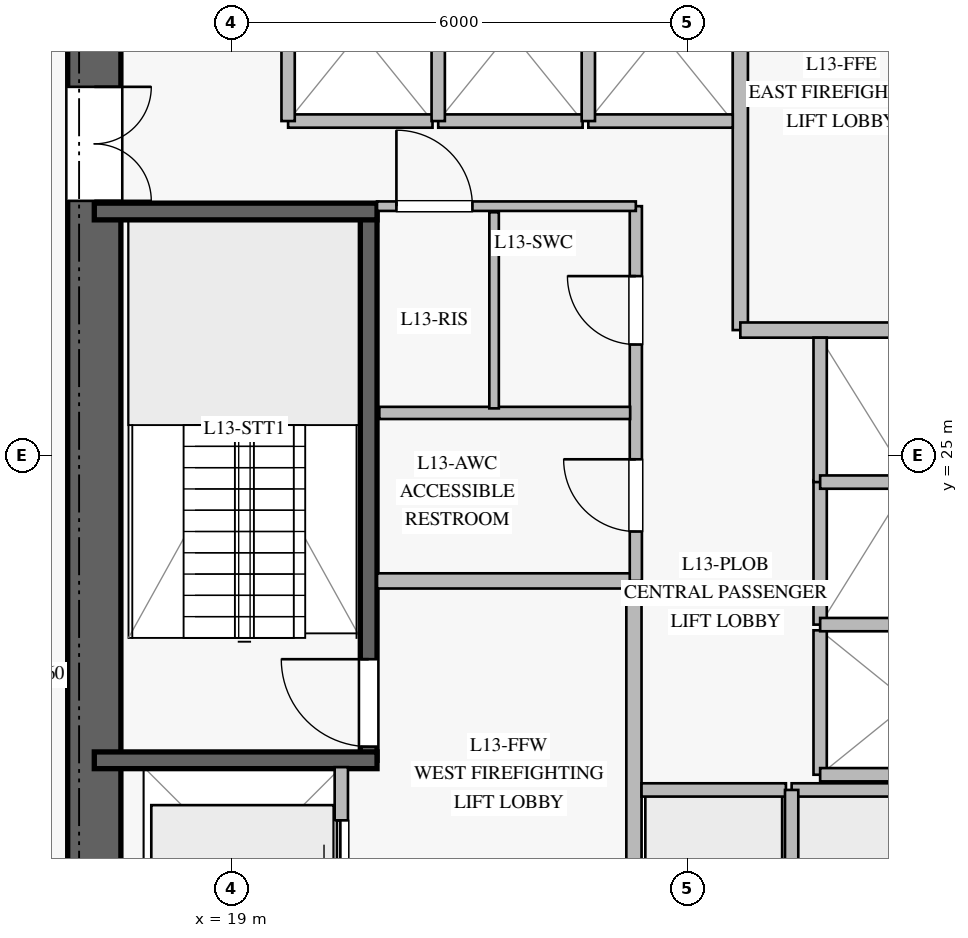
"""IFC4 building model, lengths in metres.
Left out: names, types, materials, properties, quantities, classifications, styles, units other than length and angle.
Written with IfcOpenShell. Run it as: python <this file> out.ifc"""

import sys

from ifc_helpers import new_model, si_unit, direction, frame, frame_2d, origin, place, context, subcontext, project, spatial, rectangle, extrude, element, fill, save


model = new_model("IFC4")
c1 = context("Model", 3, precision=1e-05, world=origin(), true_north=direction((0.0, 1.0)))
c2 = subcontext(c1, "Body", "Model", "MODEL_VIEW")
j1 = project(units=[si_unit("LENGTHUNIT", "METRE"), si_unit("PLANEANGLEUNIT", "RADIAN")], contexts=[c1])
p1 = place(None, origin())
s1 = spatial("IfcSite", under=j1, at=p1, CompositionType="ELEMENT")
p2 = place(p1, origin())
s2 = spatial("IfcBuilding", under=s1, at=p2, CompositionType="ELEMENT")
p3 = place(p2, frame((0.0, 0.0, 56.0)))
s3 = spatial("IfcBuildingStorey", under=s2, at=p3, CompositionType="ELEMENT", Elevation=56.0)
p4 = place(p3, frame((17.2, 31.85, 0.0), z_axis=(0.0, 0.0, 1.0), x_axis=(0.0, -1.0, 0.0)))
e1 = element("IfcWall", 1, at=p4, inside=s3, PredefinedType="SHEAR", context=c2, shape_type="SweptSolid", body=[
    extrude(rectangle(XDim=13.7, YDim=0.7, at=frame_2d((6.85, 0.0))), origin(), (0.0, 0.0, 1.0), 3.76),
])
p5 = place(p4, frame((2.0, 0.0, 0.0)))
e2 = element("IfcOpeningElement", 2, at=p5, cuts=e1, PredefinedType="OPENING", context=c2, shape_type="SweptSolid", body=[
    extrude(rectangle(XDim=1.5, YDim=2.2, at=frame_2d((0.75, 1.1))), frame((0.0, 0.36, 0.0), z_axis=(0.0, -1.0, 0.0), x_axis=(1.0, 0.0, 0.0)), (0.0, 0.0, 1.0), 0.72),
])
p6 = place(p3, frame((20.81, 20.99, 0.0), z_axis=(0.0, 0.0, 1.0), x_axis=(0.0, 1.0, 0.0)))
e3 = element("IfcWall", 3, at=p6, inside=s3, PredefinedType="SOLIDWALL", context=c2, shape_type="SweptSolid", body=[
    extrude(rectangle(XDim=7.22, YDim=0.22, at=frame_2d((3.61, 0.0))), origin(), (0.0, 0.0, 1.0), 3.76),
])
p7 = place(p6, frame((0.18, 0.0, 0.0)))
e4 = element("IfcOpeningElement", 4, at=p7, cuts=e3, PredefinedType="OPENING", context=c2, shape_type="SweptSolid", body=[
    extrude(rectangle(XDim=1.15, YDim=2.2, at=frame_2d((0.575, 1.1))), frame((0.0, 0.12, 0.0), z_axis=(0.0, -1.0, 0.0), x_axis=(1.0, 0.0, 0.0)), (0.0, 0.0, 1.0), 0.24),
])
for number, where, z_axis, x_axis in (
    (5, (17.2, 20.99, 0.0), (0.0, 0.0, 1.0), (1.0, 0.0, 0.0)),
    (6, (17.2, 28.21, 0.0), (0.0, 0.0, 1.0), (1.0, 0.0, 0.0)),
):
    element("IfcWall", number, at=place(p3, frame(where, z_axis=z_axis, x_axis=x_axis)), inside=s3, PredefinedType="SOLIDWALL", context=c2, shape_type="SweptSolid", body=[
        extrude(rectangle(XDim=3.72, YDim=0.22, at=frame_2d((1.86, 0.0))), origin(), (0.0, 0.0, 1.0), 3.76),
    ])
p8 = place(p3, frame((24.3, 18.2, 0.0), z_axis=(0.0, 0.0, 1.0), x_axis=(0.0, 1.0, 0.0)))
e7 = element("IfcWall", 7, at=p8, inside=s3, PredefinedType="PARTITIONING", context=c2, shape_type="SweptSolid", body=[
    extrude(rectangle(XDim=5.15, YDim=0.2, at=frame_2d((2.575, 0.0))), origin(), (0.0, 0.0, 1.0), 3.76),
])
p9 = place(p3, frame((20.92, 23.35, 0.0), z_axis=(0.0, 0.0, 1.0), x_axis=(1.0, 0.0, 0.0)))
e8 = element("IfcWall", 8, at=p9, inside=s3, PredefinedType="PARTITIONING", context=c2, shape_type="SweptSolid", body=[
    extrude(rectangle(XDim=3.38, YDim=0.2, at=frame_2d((1.69, 0.0))), origin(), (0.0, 0.0, 1.0), 3.76),
])
p10 = place(p3, frame((25.7, 26.65, 0.0), z_axis=(0.0, 0.0, 1.0), x_axis=(0.0, 1.0, 0.0)))
e9 = element("IfcWall", 9, at=p10, inside=s3, PredefinedType="PARTITIONING", context=c2, shape_type="SweptSolid", body=[
    extrude(rectangle(XDim=5.15, YDim=0.2, at=frame_2d((2.575, 0.0))), origin(), (0.0, 0.0, 1.0), 3.76),
])
p11 = place(p3, frame((25.7, 26.65, 0.0), z_axis=(0.0, 0.0, 1.0), x_axis=(1.0, 0.0, 0.0)))
e10 = element("IfcWall", 10, at=p11, inside=s3, PredefinedType="PARTITIONING", context=c2, shape_type="SweptSolid", body=[
    extrude(rectangle(XDim=3.38, YDim=0.2, at=frame_2d((1.69, 0.0))), origin(), (0.0, 0.0, 1.0), 3.76),
])
p12 = place(p3, frame((24.325, 23.35, 0.0), z_axis=(0.0, 0.0, 1.0), x_axis=(0.0, 1.0, 0.0)))
e11 = element("IfcWall", 11, at=p12, inside=s3, PredefinedType="PLUMBINGWALL", context=c2, shape_type="SweptSolid", body=[
    extrude(rectangle(XDim=4.93, YDim=0.16, at=frame_2d((2.465, 0.0))), origin(), (0.0, 0.0, 1.0), 3.76),
])
p13 = place(p12, frame((0.65, 0.0, 0.0)))
e12 = element("IfcOpeningElement", 12, at=p13, cuts=e11, PredefinedType="OPENING", context=c2, shape_type="SweptSolid", body=[
    extrude(rectangle(XDim=0.95, YDim=2.1, at=frame_2d((0.475, 1.05))), frame((0.0, 0.09, 0.0), z_axis=(0.0, -1.0, 0.0), x_axis=(1.0, 0.0, 0.0)), (0.0, 0.0, 1.0), 0.18),
])
p14 = place(p12, frame((3.11, 0.0, 0.0)))
e13 = element("IfcOpeningElement", 13, at=p14, cuts=e11, PredefinedType="OPENING", context=c2, shape_type="SweptSolid", body=[
    extrude(rectangle(XDim=0.9, YDim=2.1, at=frame_2d((0.45, 1.05))), frame((0.0, 0.09, 0.0), z_axis=(0.0, -1.0, 0.0), x_axis=(1.0, 0.0, 0.0)), (0.0, 0.0, 1.0), 0.18),
])
p15 = place(p3, frame((20.92, 28.28, 0.0), z_axis=(0.0, 0.0, 1.0), x_axis=(1.0, 0.0, 0.0)))
e14 = element("IfcWall", 14, at=p15, inside=s3, PredefinedType="PARTITIONING", context=c2, shape_type="SweptSolid", body=[
    extrude(rectangle(XDim=3.405, YDim=0.125, at=frame_2d((1.703, 0.0))), origin(), (0.0, 0.0, 1.0), 3.76),
])
p16 = place(p15, frame((0.255, 0.0, 0.0)))
e15 = element("IfcOpeningElement", 15, at=p16, cuts=e14, PredefinedType="OPENING", context=c2, shape_type="SweptSolid", body=[
    extrude(rectangle(XDim=1.0, YDim=2.15, at=frame_2d((0.5, 1.075))), frame((0.0, 0.073, 0.0), z_axis=(0.0, -1.0, 0.0), x_axis=(1.0, 0.0, 0.0)), (0.0, 0.0, 1.0), 0.145),
])
p17 = place(p3, frame((20.95, 25.56, 0.0), z_axis=(0.0, 0.0, 1.0), x_axis=(1.0, 0.0, 0.0)))
e16 = element("IfcWall", 16, at=p17, inside=s3, PredefinedType="PLUMBINGWALL", context=c2, shape_type="SweptSolid", body=[
    extrude(rectangle(XDim=3.3, YDim=0.16, at=frame_2d((1.65, 0.0))), origin(), (0.0, 0.0, 1.0), 3.76),
])
p18 = place(p3, frame((22.46, 25.62, 0.0), z_axis=(0.0, 0.0, 1.0), x_axis=(0.0, 1.0, 0.0)))
e17 = element("IfcWall", 17, at=p18, inside=s3, PredefinedType="PARTITIONING", context=c2, shape_type="SweptSolid", body=[
    extrude(rectangle(XDim=2.58, YDim=0.125, at=frame_2d((1.29, 0.0))), origin(), (0.0, 0.0, 1.0), 3.76),
])
p19 = place(p3, frame((24.4, 20.6, 0.0), z_axis=(0.0, 0.0, 1.0), x_axis=(1.0, 0.0, 0.0)))
e18 = element("IfcWall", 18, at=p19, inside=s3, PredefinedType="PARTITIONING", context=c2, shape_type="SweptSolid", body=[
    extrude(rectangle(XDim=1.9, YDim=0.175, at=frame_2d((0.95, 0.0))), origin(), (0.0, 0.0, 1.0), 3.76),
])
p20 = place(p3, frame((26.375, 20.6, 0.0), z_axis=(0.0, 0.0, 1.0), x_axis=(1.0, 0.0, 0.0)))
e19 = element("IfcWall", 19, at=p20, inside=s3, PredefinedType="PARTITIONING", context=c2, shape_type="SweptSolid", body=[
    extrude(rectangle(XDim=1.9, YDim=0.175, at=frame_2d((0.95, 0.0))), origin(), (0.0, 0.0, 1.0), 3.76),
])
p21 = place(p3, frame((26.375, 18.25, 0.0), z_axis=(0.0, 0.0, 1.0), x_axis=(0.0, 1.0, 0.0)))
e20 = element("IfcWall", 20, at=p21, inside=s3, PredefinedType="PARTITIONING", context=c2, shape_type="SweptSolid", body=[
    extrude(rectangle(XDim=2.35, YDim=0.175, at=frame_2d((1.175, 0.0))), origin(), (0.0, 0.0, 1.0), 3.76),
])
p22 = place(p3, frame((19.75, 29.4, 0.0), z_axis=(0.0, 0.0, 1.0), x_axis=(1.0, 0.0, 0.0)))
e21 = element("IfcWall", 21, at=p22, inside=s3, PredefinedType="PARTITIONING", context=c2, shape_type="SweptSolid", body=[
    extrude(rectangle(XDim=1.9, YDim=0.175, at=frame_2d((0.95, 0.0))), origin(), (0.0, 0.0, 1.0), 3.76),
])
p23 = place(p3, frame((19.75, 29.4, 0.0), z_axis=(0.0, 0.0, 1.0), x_axis=(0.0, 1.0, 0.0)))
e22 = element("IfcWall", 22, at=p23, inside=s3, PredefinedType="PARTITIONING", context=c2, shape_type="SweptSolid", body=[
    extrude(rectangle(XDim=2.35, YDim=0.175, at=frame_2d((1.175, 0.0))), origin(), (0.0, 0.0, 1.0), 3.76),
])
p24 = place(p3, frame((21.725, 29.4, 0.0), z_axis=(0.0, 0.0, 1.0), x_axis=(1.0, 0.0, 0.0)))
e23 = element("IfcWall", 23, at=p24, inside=s3, PredefinedType="PARTITIONING", context=c2, shape_type="SweptSolid", body=[
    extrude(rectangle(XDim=1.9, YDim=0.175, at=frame_2d((0.95, 0.0))), origin(), (0.0, 0.0, 1.0), 3.76),
])
p25 = place(p3, frame((21.725, 29.4, 0.0), z_axis=(0.0, 0.0, 1.0), x_axis=(0.0, 1.0, 0.0)))
e24 = element("IfcWall", 24, at=p25, inside=s3, PredefinedType="PARTITIONING", context=c2, shape_type="SweptSolid", body=[
    extrude(rectangle(XDim=2.35, YDim=0.175, at=frame_2d((1.175, 0.0))), origin(), (0.0, 0.0, 1.0), 3.76),
])
p26 = place(p3, frame((23.7, 29.4, 0.0), z_axis=(0.0, 0.0, 1.0), x_axis=(1.0, 0.0, 0.0)))
e25 = element("IfcWall", 25, at=p26, inside=s3, PredefinedType="PARTITIONING", context=c2, shape_type="SweptSolid", body=[
    extrude(rectangle(XDim=1.9, YDim=0.175, at=frame_2d((0.95, 0.0))), origin(), (0.0, 0.0, 1.0), 3.76),
])
p27 = place(p3, frame((23.7, 29.4, 0.0), z_axis=(0.0, 0.0, 1.0), x_axis=(0.0, 1.0, 0.0)))
e26 = element("IfcWall", 26, at=p27, inside=s3, PredefinedType="PARTITIONING", context=c2, shape_type="SweptSolid", body=[
    extrude(rectangle(XDim=2.35, YDim=0.175, at=frame_2d((1.175, 0.0))), origin(), (0.0, 0.0, 1.0), 3.76),
])
p28 = place(p3, frame((26.75, 20.8, 0.0), z_axis=(0.0, 0.0, 1.0), x_axis=(0.0, 1.0, 0.0)))
e27 = element("IfcWall", 27, at=p28, inside=s3, PredefinedType="PARTITIONING", context=c2, shape_type="SweptSolid", body=[
    extrude(rectangle(XDim=1.9, YDim=0.175, at=frame_2d((0.95, 0.0))), origin(), (0.0, 0.0, 1.0), 3.76),
])
p29 = place(p3, frame((26.75, 20.8, 0.0), z_axis=(0.0, 0.0, 1.0), x_axis=(1.0, 0.0, 0.0)))
e28 = element("IfcWall", 28, at=p29, inside=s3, PredefinedType="PARTITIONING", context=c2, shape_type="SweptSolid", body=[
    extrude(rectangle(XDim=2.35, YDim=0.175, at=frame_2d((1.175, 0.0))), origin(), (0.0, 0.0, 1.0), 3.76),
])
p30 = place(p3, frame((26.75, 22.775, 0.0), z_axis=(0.0, 0.0, 1.0), x_axis=(0.0, 1.0, 0.0)))
e29 = element("IfcWall", 29, at=p30, inside=s3, PredefinedType="PARTITIONING", context=c2, shape_type="SweptSolid", body=[
    extrude(rectangle(XDim=1.9, YDim=0.175, at=frame_2d((0.95, 0.0))), origin(), (0.0, 0.0, 1.0), 3.76),
])
p31 = place(p3, frame((26.75, 22.775, 0.0), z_axis=(0.0, 0.0, 1.0), x_axis=(1.0, 0.0, 0.0)))
e30 = element("IfcWall", 30, at=p31, inside=s3, PredefinedType="PARTITIONING", context=c2, shape_type="SweptSolid", body=[
    extrude(rectangle(XDim=2.35, YDim=0.175, at=frame_2d((1.175, 0.0))), origin(), (0.0, 0.0, 1.0), 3.76),
])
p32 = place(p3, frame((26.75, 24.65, 0.0), z_axis=(0.0, 0.0, 1.0), x_axis=(0.0, 1.0, 0.0)))
e31 = element("IfcWall", 31, at=p32, inside=s3, PredefinedType="PARTITIONING", context=c2, shape_type="SweptSolid", body=[
    extrude(rectangle(XDim=1.9, YDim=0.175, at=frame_2d((0.95, 0.0))), origin(), (0.0, 0.0, 1.0), 3.76),
])
p33 = place(p3, frame((26.75, 24.65, 0.0), z_axis=(0.0, 0.0, 1.0), x_axis=(1.0, 0.0, 0.0)))
e32 = element("IfcWall", 32, at=p33, inside=s3, PredefinedType="PARTITIONING", context=c2, shape_type="SweptSolid", body=[
    extrude(rectangle(XDim=2.35, YDim=0.175, at=frame_2d((1.175, 0.0))), origin(), (0.0, 0.0, 1.0), 3.76),
])
p34 = place(p3, frame((20.45, 18.3, 0.0), z_axis=(0.0, 0.0, 1.0), x_axis=(0.0, 1.0, 0.0)))
e33 = element("IfcWall", 33, at=p34, inside=s3, PredefinedType="PARTITIONING", context=c2, shape_type="SweptSolid", body=[
    extrude(rectangle(XDim=2.6, YDim=0.175, at=frame_2d((1.3, 0.0))), origin(), (0.0, 0.0, 1.0), 3.76),
])
p35 = place(p34, frame((0.7, 0.0, 0.0)))
e34 = element("IfcOpeningElement", 34, at=p35, cuts=e33, PredefinedType="OPENING", context=c2, shape_type="SweptSolid", body=[
    extrude(rectangle(XDim=1.2, YDim=2.2, at=frame_2d((0.6, 1.1))), frame((0.0, 0.098, 0.0), z_axis=(0.0, -1.0, 0.0), x_axis=(1.0, 0.0, 0.0)), (0.0, 0.0, 1.0), 0.195),
])
p36 = place(p7, origin())
e35 = element("IfcDoor", 35, at=p36, inside=s3, OperationType="SINGLE_SWING_RIGHT", PredefinedType="DOOR", context=c2, shape_type="SweptSolid", body=[
    extrude(rectangle(XDim=1.15, YDim=2.2, at=frame_2d((0.575, 1.1))), frame((0.0, 0.025, 0.0), z_axis=(0.0, -1.0, 0.0), x_axis=(1.0, 0.0, 0.0)), (0.0, 0.0, 1.0), 0.05),
])
fill(e4, e35)
p37 = place(p5, origin())
e36 = element("IfcDoor", 36, at=p37, inside=s3, OperationType="DOUBLE_DOOR_SINGLE_SWING", PredefinedType="DOOR", context=c2, shape_type="SweptSolid", body=[
    extrude(rectangle(XDim=1.5, YDim=2.2, at=frame_2d((0.75, 1.1))), frame((0.0, 0.025, 0.0), z_axis=(0.0, -1.0, 0.0), x_axis=(1.0, 0.0, 0.0)), (0.0, 0.0, 1.0), 0.05),
])
fill(e2, e36)
p38 = place(p13, origin())
e37 = element("IfcDoor", 37, at=p38, inside=s3, OperationType="SINGLE_SWING_RIGHT", PredefinedType="DOOR", context=c2, shape_type="SweptSolid", body=[
    extrude(rectangle(XDim=0.95, YDim=2.1, at=frame_2d((0.475, 1.05))), frame((0.0, 0.025, 0.0), z_axis=(0.0, -1.0, 0.0), x_axis=(1.0, 0.0, 0.0)), (0.0, 0.0, 1.0), 0.05),
])
fill(e12, e37)
p39 = place(p16, origin())
e38 = element("IfcDoor", 38, at=p39, inside=s3, OperationType="SINGLE_SWING_LEFT", PredefinedType="DOOR", context=c2, shape_type="SweptSolid", body=[
    extrude(rectangle(XDim=1.0, YDim=2.15, at=frame_2d((0.5, 1.075))), frame((0.0, 0.025, 0.0), z_axis=(0.0, -1.0, 0.0), x_axis=(1.0, 0.0, 0.0)), (0.0, 0.0, 1.0), 0.05),
])
fill(e15, e38)
p40 = place(p14, origin())
e39 = element("IfcDoor", 39, at=p40, inside=s3, OperationType="SINGLE_SWING_RIGHT", PredefinedType="DOOR", context=c2, shape_type="SweptSolid", body=[
    extrude(rectangle(XDim=0.9, YDim=2.1, at=frame_2d((0.45, 1.05))), frame((0.0, 0.025, 0.0), z_axis=(0.0, -1.0, 0.0), x_axis=(1.0, 0.0, 0.0)), (0.0, 0.0, 1.0), 0.05),
])
fill(e13, e39)
p41 = place(p35, origin())
e40 = element("IfcDoor", 40, at=p41, inside=s3, OperationType="DOUBLE_DOOR_SLIDING", PredefinedType="DOOR", context=c2, shape_type="SweptSolid", body=[
    extrude(rectangle(XDim=1.2, YDim=2.2, at=frame_2d((0.6, 1.1))), frame((0.0, 0.025, 0.0), z_axis=(0.0, -1.0, 0.0), x_axis=(1.0, 0.0, 0.0)), (0.0, 0.0, 1.0), 0.05),
])
fill(e34, e40)
save(model, sys.argv[1])
